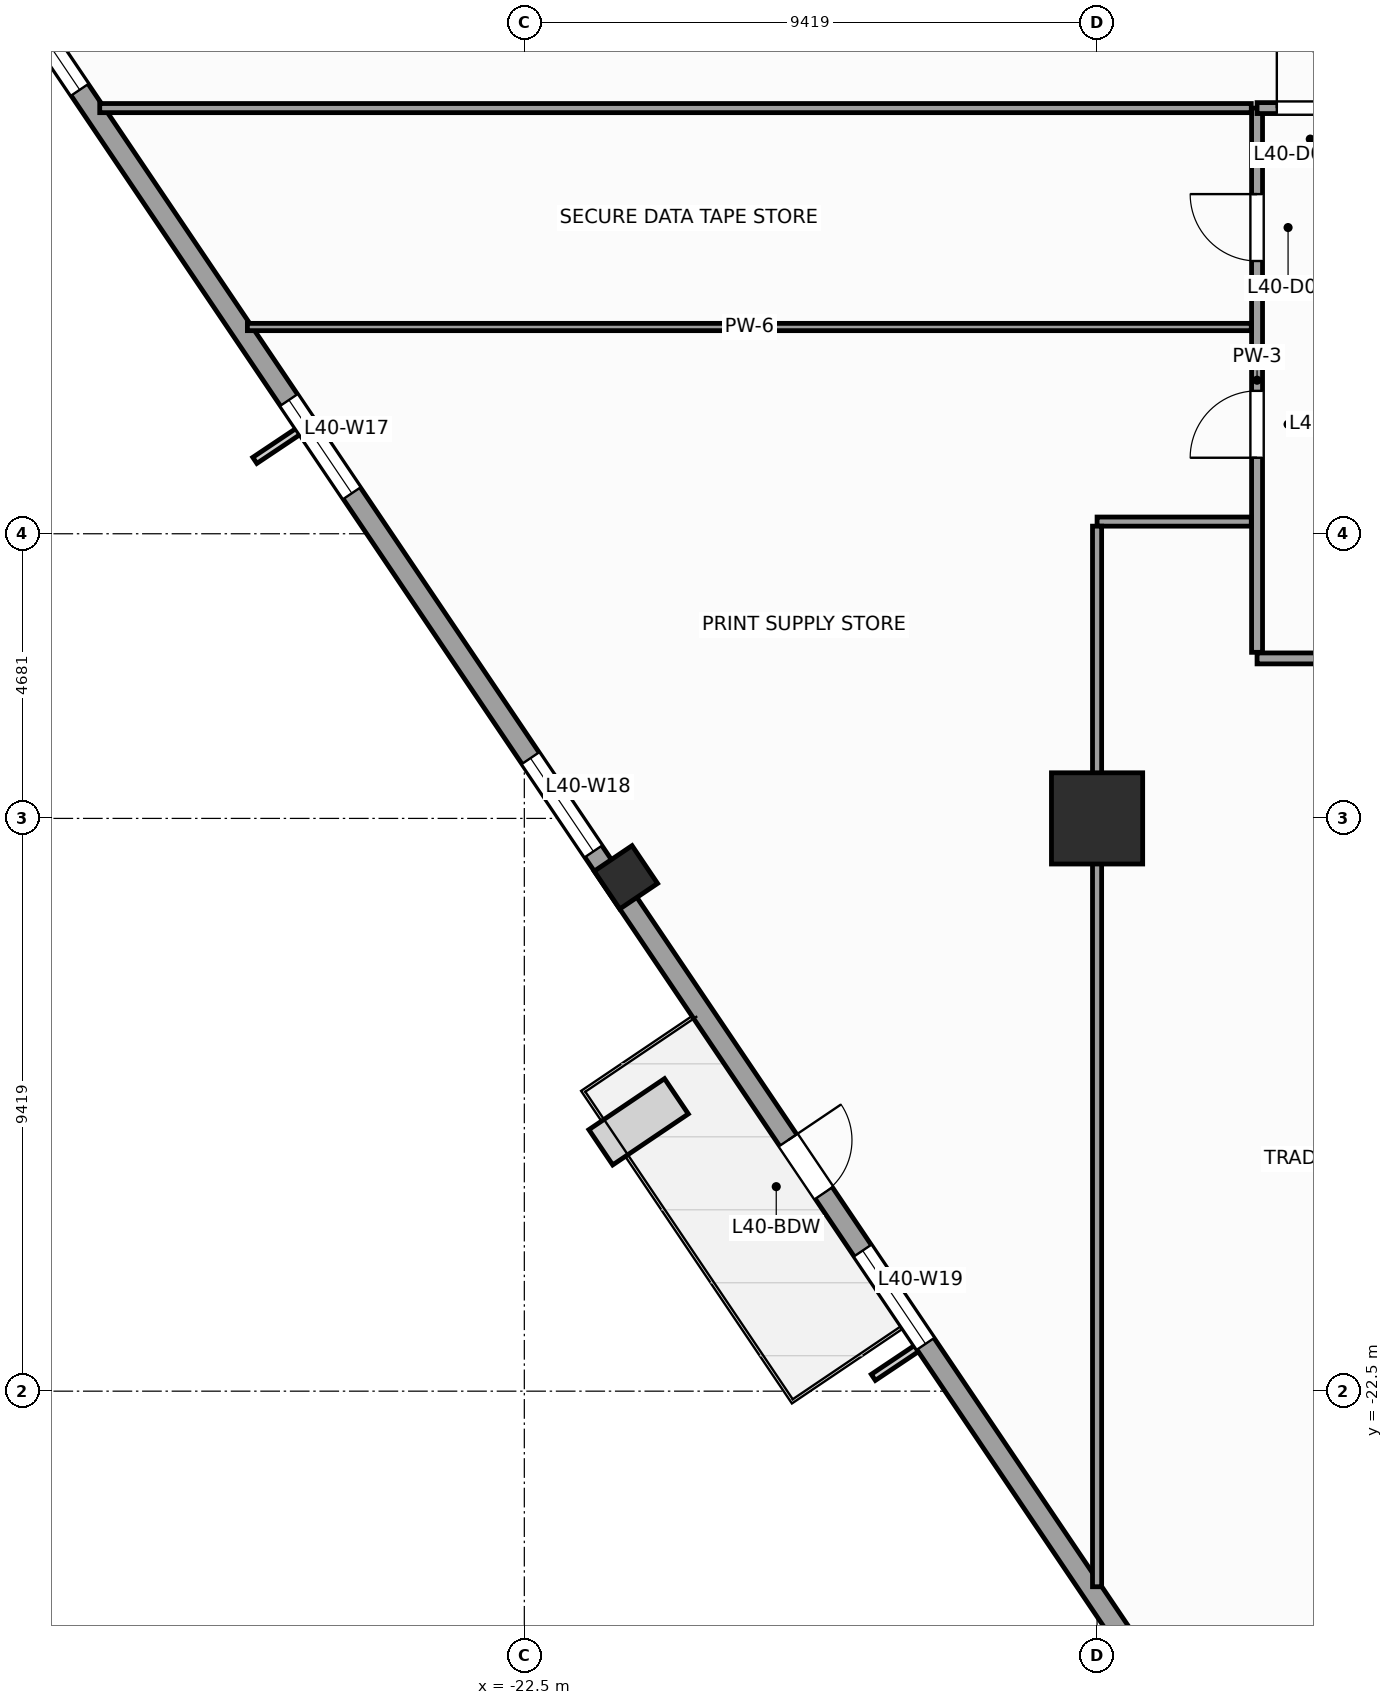
"""IFC4 building model, lengths in metres.
Left out: names, types, materials, properties, quantities, classifications, styles, units other than length and angle.
Written with IfcOpenShell. Run it as: python <this file> out.ifc"""

import sys

from ifc_helpers import new_model, si_unit, direction, frame, frame_2d, origin, origin_2d, place, context, subcontext, project, spatial, rectangle, extrude, source, transform, mapped, element, fill, save


model = new_model("IFC4")
c1 = context("Model", 3, precision=1e-05, world=origin(), true_north=direction((0.0, 1.0)))
c2 = subcontext(c1, "Body", "Model", "MODEL_VIEW")
j1 = project(units=[si_unit("LENGTHUNIT", "METRE"), si_unit("PLANEANGLEUNIT", "RADIAN")], contexts=[c1])
p1 = place(None, origin())
s1 = spatial("IfcSite", under=j1, at=p1, CompositionType="ELEMENT")
p2 = place(p1, origin())
s2 = spatial("IfcBuilding", under=s1, at=p2, CompositionType="ELEMENT")
p3 = place(p2, frame((0.0, 0.0, 168.4)))
s3 = spatial("IfcBuildingStorey", under=s2, at=p3, CompositionType="ELEMENT", Elevation=168.4)
m1 = source(origin(), c2, "Body", "SweptSolid", [
    extrude(rectangle(XDim=1.5, YDim=1.5, at=origin_2d()), origin(), (0.0, 0.0, 1.0), 4.0),
])
p4 = place(p3, frame((-13.081, -13.081, 0.0), z_axis=(0.0, 0.0, 1.0), x_axis=(1.0, 0.0, 0.0)))
e1 = element("IfcColumn", 1, at=p4, inside=s3, PredefinedType="COLUMN", context=c2, shape_type="MappedRepresentation", body=[
    mapped(m1, transform((0.0, 0.0, 0.0), scale=1.0)),
])
m2 = source(origin(), c2, "Body", "SweptSolid", [
    extrude(rectangle(XDim=0.75, YDim=0.75, at=origin_2d()), origin(), (0.0, 0.0, 1.0), 4.0),
])
p5 = place(p3, frame((-20.83, -14.05, 0.0), z_axis=(0.0, 0.0, 1.0), x_axis=(0.829037572555, 0.559192903471, 0.0)))
e2 = element("IfcColumn", 2, at=p5, inside=s3, PredefinedType="COLUMN", context=c2, shape_type="MappedRepresentation", body=[
    mapped(m2, transform((0.0, 0.0, 0.0), scale=1.0)),
])
p6 = place(p3, frame((-32.558, 2.972, 0.0), z_axis=(0.0, 0.0, 1.0), x_axis=(0.559194910251, -0.829036218961, 0.0)))
e3 = element("IfcWall", 3, at=p6, inside=s3, PredefinedType="STANDARD", context=c2, shape_type="SweptSolid", body=[
    extrude(rectangle(XDim=41.34, YDim=0.34, at=frame_2d((20.67, 0.0))), origin(), (0.0, 0.0, 1.0), 3.04),
])
p7 = place(p6, frame((25.745, 0.0, 0.0)))
e4 = element("IfcOpeningElement", 4, at=p7, cuts=e3, PredefinedType="OPENING", context=c2, shape_type="SweptSolid", body=[
    extrude(rectangle(XDim=1.05, YDim=2.25, at=frame_2d((0.525, 1.125))), frame((0.0, 0.18, 0.0), z_axis=(0.0, -1.0, 0.0), x_axis=(1.0, 0.0, 0.0)), (0.0, 0.0, 1.0), 0.36),
])
p8 = place(p6, frame((3.511, 0.0, 0.56)))
e5 = element("IfcOpeningElement", 5, at=p8, cuts=e3, PredefinedType="OPENING", context=c2, shape_type="SweptSolid", body=[
    extrude(rectangle(XDim=1.4, YDim=2.4, at=frame_2d((0.7, 1.2))), frame((0.0, 0.18, 0.0), z_axis=(0.0, -1.0, 0.0), x_axis=(1.0, 0.0, 0.0)), (0.0, 0.0, 1.0), 0.36),
])
p9 = place(p6, frame((11.064, 0.0, 0.61)))
e6 = element("IfcOpeningElement", 6, at=p9, cuts=e3, PredefinedType="OPENING", context=c2, shape_type="SweptSolid", body=[
    extrude(rectangle(XDim=1.85, YDim=2.35, at=frame_2d((0.925, 1.175))), frame((0.0, 0.18, 0.0), z_axis=(0.0, -1.0, 0.0), x_axis=(1.0, 0.0, 0.0)), (0.0, 0.0, 1.0), 0.36),
])
p10 = place(p6, frame((18.168, 0.0, 0.61)))
e7 = element("IfcOpeningElement", 7, at=p10, cuts=e3, PredefinedType="OPENING", context=c2, shape_type="SweptSolid", body=[
    extrude(rectangle(XDim=1.85, YDim=2.35, at=frame_2d((0.925, 1.175))), frame((0.0, 0.18, 0.0), z_axis=(0.0, -1.0, 0.0), x_axis=(1.0, 0.0, 0.0)), (0.0, 0.0, 1.0), 0.36),
])
p11 = place(p6, frame((27.936, 0.0, 0.61)))
e8 = element("IfcOpeningElement", 8, at=p11, cuts=e3, PredefinedType="OPENING", context=c2, shape_type="SweptSolid", body=[
    extrude(rectangle(XDim=1.85, YDim=2.35, at=frame_2d((0.925, 1.175))), frame((0.0, 0.18, 0.0), z_axis=(0.0, -1.0, 0.0), x_axis=(1.0, 0.0, 0.0)), (0.0, 0.0, 1.0), 0.36),
])
p12 = place(p6, frame((35.602, 0.0, 0.56)))
e9 = element("IfcOpeningElement", 9, at=p12, cuts=e3, PredefinedType="OPENING", context=c2, shape_type="SweptSolid", body=[
    extrude(rectangle(XDim=1.4, YDim=2.4, at=frame_2d((0.7, 1.2))), frame((0.0, 0.18, 0.0), z_axis=(0.0, -1.0, 0.0), x_axis=(1.0, 0.0, 0.0)), (0.0, 0.0, 1.0), 0.36),
])
p13 = place(p3, frame((-10.45, -10.45, 0.0), z_axis=(0.0, 0.0, 1.0), x_axis=(1.0, 0.0, 0.0)))
e10 = element("IfcWall", 10, at=p13, inside=s3, PredefinedType="PARTITIONING", context=c2, shape_type="SweptSolid", body=[
    extrude(rectangle(XDim=22.05, YDim=0.18, at=frame_2d((11.025, 0.0))), origin(), (0.0, 0.0, 1.0), 3.74),
])
p14 = place(p13, frame((15.086, 0.0, 0.0)))
e11 = element("IfcOpeningElement", 11, at=p14, cuts=e10, PredefinedType="OPENING", context=c2, shape_type="SweptSolid", body=[
    extrude(rectangle(XDim=0.95, YDim=2.1, at=frame_2d((0.475, 1.05))), frame((0.0, 0.1, 0.0), z_axis=(0.0, -1.0, 0.0), x_axis=(1.0, 0.0, 0.0)), (0.0, 0.0, 1.0), 0.2),
])
p15 = place(p13, frame((7.611, 0.0, 0.0)))
e12 = element("IfcOpeningElement", 12, at=p15, cuts=e10, PredefinedType="OPENING", context=c2, shape_type="SweptSolid", body=[
    extrude(rectangle(XDim=0.95, YDim=2.1, at=frame_2d((0.475, 1.05))), frame((0.0, 0.1, 0.0), z_axis=(0.0, -1.0, 0.0), x_axis=(1.0, 0.0, 0.0)), (0.0, 0.0, 1.0), 0.2),
])
p16 = place(p13, frame((2.939, 0.0, 0.0)))
e13 = element("IfcOpeningElement", 13, at=p16, cuts=e10, PredefinedType="OPENING", context=c2, shape_type="SweptSolid", body=[
    extrude(rectangle(XDim=1.1, YDim=2.2, at=frame_2d((0.55, 1.1))), frame((0.0, 0.1, 0.0), z_axis=(0.0, -1.0, 0.0), x_axis=(1.0, 0.0, 0.0)), (0.0, 0.0, 1.0), 0.2),
])
p17 = place(p13, frame((11.175, 0.0, 0.0)))
e14 = element("IfcOpeningElement", 14, at=p17, cuts=e10, PredefinedType="OPENING", context=c2, shape_type="SweptSolid", body=[
    extrude(rectangle(XDim=1.1, YDim=2.2, at=frame_2d((0.55, 1.1))), frame((0.0, 0.1, 0.0), z_axis=(0.0, -1.0, 0.0), x_axis=(1.0, 0.0, 0.0)), (0.0, 0.0, 1.0), 0.2),
])
p18 = place(p13, frame((18.805, 0.0, 0.0)))
e15 = element("IfcOpeningElement", 15, at=p18, cuts=e10, PredefinedType="OPENING", context=c2, shape_type="SweptSolid", body=[
    extrude(rectangle(XDim=1.1, YDim=2.2, at=frame_2d((0.55, 1.1))), frame((0.0, 0.1, 0.0), z_axis=(0.0, -1.0, 0.0), x_axis=(1.0, 0.0, 0.0)), (0.0, 0.0, 1.0), 0.2),
])
p19 = place(p3, frame((-10.45, -10.35, 0.0), z_axis=(0.0, 0.0, 1.0), x_axis=(0.0, 1.0, 0.0)))
e16 = element("IfcWall", 16, at=p19, inside=s3, PredefinedType="PARTITIONING", context=c2, shape_type="SweptSolid", body=[
    extrude(rectangle(XDim=8.95, YDim=0.18, at=frame_2d((4.475, 0.0))), origin(), (0.0, 0.0, 1.0), 3.74),
])
p20 = place(p19, frame((6.436, 0.0, 0.0)))
e17 = element("IfcOpeningElement", 17, at=p20, cuts=e16, PredefinedType="OPENING", context=c2, shape_type="SweptSolid", body=[
    extrude(rectangle(XDim=1.1, YDim=2.2, at=frame_2d((0.55, 1.1))), frame((0.0, 0.1, 0.0), z_axis=(0.0, -1.0, 0.0), x_axis=(1.0, 0.0, 0.0)), (0.0, 0.0, 1.0), 0.2),
])
p21 = place(p19, frame((3.2, 0.0, 0.0)))
e18 = element("IfcOpeningElement", 18, at=p21, cuts=e16, PredefinedType="OPENING", context=c2, shape_type="SweptSolid", body=[
    extrude(rectangle(XDim=1.1, YDim=2.2, at=frame_2d((0.55, 1.1))), frame((0.0, 0.1, 0.0), z_axis=(0.0, -1.0, 0.0), x_axis=(1.0, 0.0, 0.0)), (0.0, 0.0, 1.0), 0.2),
])
p22 = place(p3, frame((-10.45, -1.4, 0.0), z_axis=(0.0, 0.0, 1.0), x_axis=(1.0, 0.0, 0.0)))
e19 = element("IfcWall", 19, at=p22, inside=s3, PredefinedType="PARTITIONING", context=c2, shape_type="SweptSolid", body=[
    extrude(rectangle(XDim=1.75, YDim=0.18, at=frame_2d((0.875, 0.0))), origin(), (0.0, 0.0, 1.0), 3.74),
])
p23 = place(p22, frame((0.325, 0.0, 0.0)))
e20 = element("IfcOpeningElement", 20, at=p23, cuts=e19, PredefinedType="OPENING", context=c2, shape_type="SweptSolid", body=[
    extrude(rectangle(XDim=1.1, YDim=2.2, at=frame_2d((0.55, 1.1))), frame((0.0, 0.1, 0.0), z_axis=(0.0, -1.0, 0.0), x_axis=(1.0, 0.0, 0.0)), (0.0, 0.0, 1.0), 0.2),
])
p24 = place(p3, frame((-29.482, -1.4, 0.0), z_axis=(0.0, 0.0, 1.0), x_axis=(1.0, 0.0, 0.0)))
e21 = element("IfcWall", 21, at=p24, inside=s3, PredefinedType="PARTITIONING", context=c2, shape_type="SweptSolid", body=[
    extrude(rectangle(XDim=18.938, YDim=0.15, at=frame_2d((9.469, 0.0))), origin(), (0.0, 0.0, 1.0), 3.74),
])
p25 = place(p3, frame((-10.545, -8.2, 0.0), z_axis=(0.0, 0.0, 1.0), x_axis=(-1.0, 0.0, 0.0)))
e22 = element("IfcWall", 22, at=p25, inside=s3, PredefinedType="PARTITIONING", context=c2, shape_type="SweptSolid", body=[
    extrude(rectangle(XDim=2.536, YDim=0.15, at=frame_2d((1.268, 0.0))), origin(), (0.0, 0.0, 1.0), 3.74),
])
p26 = place(p3, frame((-13.081, -8.275, 0.0), z_axis=(0.0, 0.0, 1.0), x_axis=(0.0, -1.0, 0.0)))
e23 = element("IfcWall", 23, at=p26, inside=s3, PredefinedType="PARTITIONING", context=c2, shape_type="SweptSolid", body=[
    extrude(rectangle(XDim=17.441, YDim=0.15, at=frame_2d((8.721, 0.0))), origin(), (0.0, 0.0, 1.0), 2.84),
])
p27 = place(p3, frame((-27.054, -5.0, 0.0), z_axis=(0.0, 0.0, 1.0), x_axis=(1.0, 0.0, 0.0)))
e24 = element("IfcWall", 24, at=p27, inside=s3, PredefinedType="PARTITIONING", context=c2, shape_type="SweptSolid", body=[
    extrude(rectangle(XDim=16.509, YDim=0.12, at=frame_2d((8.255, 0.0))), origin(), (0.0, 0.0, 1.0), 3.74),
])
m3 = source(origin(), c2, "Body", "SweptSolid", [
    extrude(rectangle(XDim=1.05, YDim=2.25, at=frame_2d((0.525, 1.125))), frame((0.0, 0.025, 0.0), z_axis=(0.0, -1.0, 0.0), x_axis=(1.0, 0.0, 0.0)), (0.0, 0.0, 1.0), 0.05),
])
p28 = place(p7, origin())
e25 = element("IfcDoor", 25, at=p28, inside=s3, OperationType="SINGLE_SWING_LEFT", PredefinedType="DOOR", context=c2, shape_type="MappedRepresentation", body=[
    mapped(m3, transform((0.0, 0.0, 0.0), scale=1.0)),
])
fill(e4, e25)
m4 = source(origin(), c2, "Body", "SweptSolid", [
    extrude(rectangle(XDim=1.4, YDim=2.4, at=frame_2d((0.7, 1.2))), frame((0.0, 0.03, 0.0), z_axis=(0.0, -1.0, 0.0), x_axis=(1.0, 0.0, 0.0)), (0.0, 0.0, 1.0), 0.06),
])
p29 = place(p8, origin())
e26 = element("IfcWindow", 26, at=p29, inside=s3, PartitioningType="SINGLE_PANEL", PredefinedType="WINDOW", context=c2, shape_type="MappedRepresentation", body=[
    mapped(m4, transform((0.0, 0.0, 0.0), scale=1.0)),
])
fill(e5, e26)
m5 = source(origin(), c2, "Body", "SweptSolid", [
    extrude(rectangle(XDim=1.85, YDim=2.35, at=frame_2d((0.925, 1.175))), frame((0.0, 0.03, 0.0), z_axis=(0.0, -1.0, 0.0), x_axis=(1.0, 0.0, 0.0)), (0.0, 0.0, 1.0), 0.06),
])
p30 = place(p9, origin())
e27 = element("IfcWindow", 27, at=p30, inside=s3, PartitioningType="SINGLE_PANEL", PredefinedType="WINDOW", context=c2, shape_type="MappedRepresentation", body=[
    mapped(m5, transform((0.0, 0.0, 0.0), scale=1.0)),
])
fill(e6, e27)
p31 = place(p10, origin())
e28 = element("IfcWindow", 28, at=p31, inside=s3, PartitioningType="SINGLE_PANEL", PredefinedType="WINDOW", context=c2, shape_type="MappedRepresentation", body=[
    mapped(m5, transform((0.0, 0.0, 0.0), scale=1.0)),
])
fill(e7, e28)
p32 = place(p11, origin())
e29 = element("IfcWindow", 29, at=p32, inside=s3, PartitioningType="SINGLE_PANEL", PredefinedType="WINDOW", context=c2, shape_type="MappedRepresentation", body=[
    mapped(m5, transform((0.0, 0.0, 0.0), scale=1.0)),
])
fill(e8, e29)
m6 = source(origin(), c2, "Body", "SweptSolid", [
    extrude(rectangle(XDim=1.1, YDim=2.2, at=frame_2d((0.55, 1.1))), frame((0.0, 0.025, 0.0), z_axis=(0.0, -1.0, 0.0), x_axis=(1.0, 0.0, 0.0)), (0.0, 0.0, 1.0), 0.05),
])
p33 = place(p23, origin())
e30 = element("IfcDoor", 30, at=p33, inside=s3, OperationType="SINGLE_SWING_LEFT", PredefinedType="DOOR", context=c2, shape_type="MappedRepresentation", body=[
    mapped(m6, transform((0.0, 0.0, 0.0), scale=1.0)),
])
fill(e20, e30)
p34 = place(p20, origin())
e31 = element("IfcDoor", 31, at=p34, inside=s3, OperationType="SINGLE_SWING_RIGHT", PredefinedType="DOOR", context=c2, shape_type="MappedRepresentation", body=[
    mapped(m6, transform((0.0, 0.0, 0.0), scale=1.0)),
])
fill(e17, e31)
p35 = place(p21, origin())
e32 = element("IfcDoor", 32, at=p35, inside=s3, OperationType="SINGLE_SWING_LEFT", PredefinedType="DOOR", context=c2, shape_type="MappedRepresentation", body=[
    mapped(m6, transform((0.0, 0.0, 0.0), scale=1.0)),
])
fill(e18, e32)
save(model, sys.argv[1])
